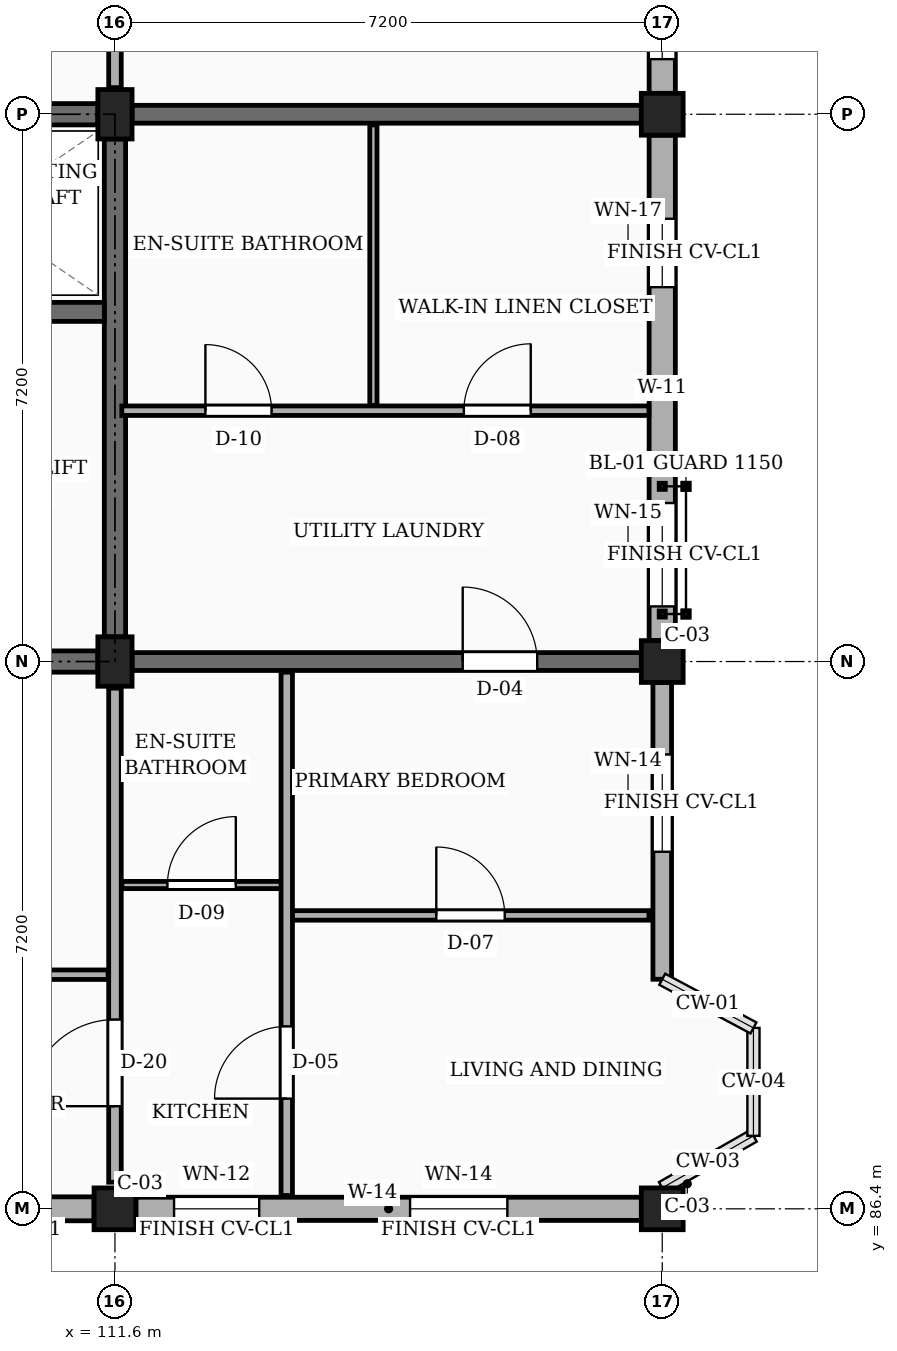
"""IFC4 building model, lengths in metres.
Left out: names, types, materials, properties, quantities, classifications, styles, units other than length and angle.
Written with IfcOpenShell. Run it as: python <this file> out.ifc"""

import sys

from ifc_helpers import new_model, si_unit, direction, frame, frame_2d, origin, origin_2d, place, context, subcontext, project, spatial, rectangle, extrude, element, fill, save


model = new_model("IFC4")
c1 = context("Model", 3, precision=1e-05, world=origin(), true_north=direction((0.0, 1.0)))
c2 = subcontext(c1, "Body", "Model", "MODEL_VIEW")
j1 = project(units=[si_unit("LENGTHUNIT", "METRE"), si_unit("PLANEANGLEUNIT", "RADIAN")], contexts=[c1])
p1 = place(None, origin())
s1 = spatial("IfcSite", under=j1, at=p1, CompositionType="ELEMENT")
p2 = place(p1, origin())
s2 = spatial("IfcBuilding", under=s1, at=p2, CompositionType="ELEMENT")
p3 = place(p2, frame((0.0, 0.0, 20.25)))
s3 = spatial("IfcBuildingStorey", under=s2, at=p3, CompositionType="ELEMENT", Elevation=20.25)
p4 = place(p3, frame((111.6, 86.4, 0.0), z_axis=(0.0, 0.0, 1.0), x_axis=(1.0, 0.0, 0.0)))
e1 = element("IfcColumn", 1, at=p4, inside=s3, PredefinedType="COLUMN", context=c2, shape_type="SweptSolid", body=[
    extrude(rectangle(XDim=0.55, YDim=0.55, at=origin_2d()), origin(), (0.0, 0.0, 1.0), 3.15),
])
for number, where, z_axis, x_axis in (
    (2, (111.6, 93.6, 0.0), (0.0, 0.0, 1.0), (1.0, 0.0, 0.0)),
    (3, (111.6, 100.8, 0.0), (0.0, 0.0, 1.0), (1.0, 0.0, 0.0)),
):
    element("IfcColumn", number, at=place(p3, frame(where, z_axis=z_axis, x_axis=x_axis)), inside=s3, PredefinedType="COLUMN", context=c2, shape_type="SweptSolid", body=[
        extrude(rectangle(XDim=0.45, YDim=0.65, at=origin_2d()), origin(), (0.0, 0.0, 1.0), 3.15),
    ])
for number, where, z_axis, x_axis in (
    (4, (118.8, 86.4, 0.0), (0.0, 0.0, 1.0), (1.0, 0.0, 0.0)),
    (5, (118.8, 93.6, 0.0), (0.0, 0.0, 1.0), (1.0, 0.0, 0.0)),
    (6, (118.8, 100.8, 0.0), (0.0, 0.0, 1.0), (1.0, 0.0, 0.0)),
):
    element("IfcColumn", number, at=place(p3, frame(where, z_axis=z_axis, x_axis=x_axis)), inside=s3, PredefinedType="COLUMN", context=c2, shape_type="SweptSolid", body=[
        extrude(rectangle(XDim=0.55, YDim=0.55, at=origin_2d()), origin(), (0.0, 0.0, 1.0), 3.15),
    ])
p5 = place(p3, frame((111.825, 93.6, 0.0), z_axis=(0.0, 0.0, 1.0), x_axis=(1.0, 0.0, 0.0)))
e7 = element("IfcWall", 7, at=p5, inside=s3, PredefinedType="SOLIDWALL", context=c2, shape_type="SweptSolid", body=[
    extrude(rectangle(XDim=6.7, YDim=0.235, at=frame_2d((3.35, 0.0))), origin(), (0.0, 0.0, 1.0), 2.19),
])
p6 = place(p5, frame((4.35, 0.0, 0.0)))
e8 = element("IfcOpeningElement", 8, at=p6, cuts=e7, PredefinedType="OPENING", context=c2, shape_type="SweptSolid", body=[
    extrude(rectangle(XDim=0.98, YDim=2.12, at=frame_2d((0.49, 1.06))), frame((0.0, 0.127, 0.0), z_axis=(0.0, -1.0, 0.0), x_axis=(1.0, 0.0, 0.0)), (0.0, 0.0, 1.0), 0.255),
])
p7 = place(p3, frame((111.825, 100.8, 0.0), z_axis=(0.0, 0.0, 1.0), x_axis=(1.0, 0.0, 0.0)))
e9 = element("IfcWall", 9, at=p7, inside=s3, PredefinedType="SOLIDWALL", context=c2, shape_type="SweptSolid", body=[
    extrude(rectangle(XDim=6.7, YDim=0.235, at=frame_2d((3.35, 0.0))), origin(), (0.0, 0.0, 1.0), 2.19),
])
p8 = place(p3, frame((104.675, 86.4, 0.0), z_axis=(0.0, 0.0, 1.0), x_axis=(1.0, 0.0, 0.0)))
e10 = element("IfcWall", 10, at=p8, inside=s3, PredefinedType="SOLIDWALL", context=c2, shape_type="SweptSolid", body=[
    extrude(rectangle(XDim=6.65, YDim=0.315, at=frame_2d((3.325, 0.0))), origin(), (0.0, 0.0, 1.0), 2.46),
])
p9 = place(p8, frame((0.45, 0.0, 0.78)))
e11 = element("IfcOpeningElement", 11, at=p9, cuts=e10, PredefinedType="OPENING", context=c2, shape_type="SweptSolid", body=[
    extrude(rectangle(XDim=0.96, YDim=1.26, at=frame_2d((0.48, 0.63))), frame((0.0, 0.167, 0.0), z_axis=(0.0, -1.0, 0.0), x_axis=(1.0, 0.0, 0.0)), (0.0, 0.0, 1.0), 0.335),
])
p10 = place(p8, frame((4.65, 0.0, 0.78)))
e12 = element("IfcOpeningElement", 12, at=p10, cuts=e10, PredefinedType="OPENING", context=c2, shape_type="SweptSolid", body=[
    extrude(rectangle(XDim=1.12, YDim=1.26, at=frame_2d((0.56, 0.63))), frame((0.0, 0.167, 0.0), z_axis=(0.0, -1.0, 0.0), x_axis=(1.0, 0.0, 0.0)), (0.0, 0.0, 1.0), 0.335),
])
p11 = place(p3, frame((111.875, 86.4, 0.0), z_axis=(0.0, 0.0, 1.0), x_axis=(1.0, 0.0, 0.0)))
e13 = element("IfcWall", 13, at=p11, inside=s3, PredefinedType="SOLIDWALL", context=c2, shape_type="SweptSolid", body=[
    extrude(rectangle(XDim=6.65, YDim=0.305, at=frame_2d((3.325, 0.0))), origin(), (0.0, 0.0, 1.0), 2.46),
])
p12 = place(p11, frame((0.502, 0.0, 0.78)))
e14 = element("IfcOpeningElement", 14, at=p12, cuts=e13, PredefinedType="OPENING", context=c2, shape_type="SweptSolid", body=[
    extrude(rectangle(XDim=1.12, YDim=1.26, at=frame_2d((0.56, 0.63))), frame((0.0, 0.163, 0.0), z_axis=(0.0, -1.0, 0.0), x_axis=(1.0, 0.0, 0.0)), (0.0, 0.0, 1.0), 0.325),
])
p13 = place(p11, frame((3.607, 0.0, 0.78)))
e15 = element("IfcOpeningElement", 15, at=p13, cuts=e13, PredefinedType="OPENING", context=c2, shape_type="SweptSolid", body=[
    extrude(rectangle(XDim=1.28, YDim=1.26, at=frame_2d((0.64, 0.63))), frame((0.0, 0.163, 0.0), z_axis=(0.0, -1.0, 0.0), x_axis=(1.0, 0.0, 0.0)), (0.0, 0.0, 1.0), 0.325),
])
p14 = place(p3, frame((118.8, 89.42, 0.0), z_axis=(0.0, 0.0, 1.0), x_axis=(0.0, 1.0, 0.0)))
e16 = element("IfcWall", 16, at=p14, inside=s3, PredefinedType="SOLIDWALL", context=c2, shape_type="SweptSolid", body=[
    extrude(rectangle(XDim=3.905, YDim=0.245, at=frame_2d((1.953, 0.0))), origin(), (0.0, 0.0, 1.0), 2.46),
])
p15 = place(p14, frame((1.677, 0.0, 0.78)))
e17 = element("IfcOpeningElement", 17, at=p15, cuts=e16, PredefinedType="OPENING", context=c2, shape_type="SweptSolid", body=[
    extrude(rectangle(XDim=1.28, YDim=1.26, at=frame_2d((0.64, 0.63))), frame((0.0, 0.133, 0.0), z_axis=(0.0, -1.0, 0.0), x_axis=(1.0, 0.0, 0.0)), (0.0, 0.0, 1.0), 0.265),
])
p16 = place(p3, frame((118.8, 93.875, 0.0), z_axis=(0.0, 0.0, 1.0), x_axis=(0.0, 1.0, 0.0)))
e18 = element("IfcWall", 18, at=p16, inside=s3, PredefinedType="SOLIDWALL", context=c2, shape_type="SweptSolid", body=[
    extrude(rectangle(XDim=6.65, YDim=0.345, at=frame_2d((3.325, 0.0))), origin(), (0.0, 0.0, 1.0), 2.46),
])
p17 = place(p16, frame((0.45, 0.0, 0.78)))
e19 = element("IfcOpeningElement", 19, at=p17, cuts=e18, PredefinedType="OPENING", context=c2, shape_type="SweptSolid", body=[
    extrude(rectangle(XDim=1.36, YDim=1.26, at=frame_2d((0.68, 0.63))), frame((0.0, 0.183, 0.0), z_axis=(0.0, -1.0, 0.0), x_axis=(1.0, 0.0, 0.0)), (0.0, 0.0, 1.0), 0.365),
])
p18 = place(p16, frame((4.65, 0.0, 0.78)))
e20 = element("IfcOpeningElement", 20, at=p18, cuts=e18, PredefinedType="OPENING", context=c2, shape_type="SweptSolid", body=[
    extrude(rectangle(XDim=0.9, YDim=1.36, at=frame_2d((0.45, 0.68))), frame((0.0, 0.183, 0.0), z_axis=(0.0, -1.0, 0.0), x_axis=(1.0, 0.0, 0.0)), (0.0, 0.0, 1.0), 0.365),
])
p19 = place(p3, frame((118.8, 101.075, 0.0), z_axis=(0.0, 0.0, 1.0), x_axis=(0.0, 1.0, 0.0)))
e21 = element("IfcWall", 21, at=p19, inside=s3, PredefinedType="SOLIDWALL", context=c2, shape_type="SweptSolid", body=[
    extrude(rectangle(XDim=6.65, YDim=0.345, at=frame_2d((3.325, 0.0))), origin(), (0.0, 0.0, 1.0), 2.46),
])
p20 = place(p19, frame((0.45, 0.0, 0.78)))
e22 = element("IfcOpeningElement", 22, at=p20, cuts=e21, PredefinedType="OPENING", context=c2, shape_type="SweptSolid", body=[
    extrude(rectangle(XDim=0.9, YDim=1.36, at=frame_2d((0.45, 0.68))), frame((0.0, 0.183, 0.0), z_axis=(0.0, -1.0, 0.0), x_axis=(1.0, 0.0, 0.0)), (0.0, 0.0, 1.0), 0.365),
])
p21 = place(p19, frame((4.65, 0.0, 0.78)))
e23 = element("IfcOpeningElement", 23, at=p21, cuts=e21, PredefinedType="OPENING", context=c2, shape_type="SweptSolid", body=[
    extrude(rectangle(XDim=1.06, YDim=1.36, at=frame_2d((0.53, 0.68))), frame((0.0, 0.183, 0.0), z_axis=(0.0, -1.0, 0.0), x_axis=(1.0, 0.0, 0.0)), (0.0, 0.0, 1.0), 0.365),
])
p22 = place(p3, frame((104.625, 100.8, 0.0), z_axis=(0.0, 0.0, 1.0), x_axis=(1.0, 0.0, 0.0)))
e24 = element("IfcWall", 24, at=p22, inside=s3, PredefinedType="SHEAR", context=c2, shape_type="SweptSolid", body=[
    extrude(rectangle(XDim=6.75, YDim=0.28, at=frame_2d((3.375, 0.0))), origin(), (0.0, 0.0, 1.0), 2.89),
])
p23 = place(p3, frame((111.6, 93.925, 0.0), z_axis=(0.0, 0.0, 1.0), x_axis=(0.0, 1.0, 0.0)))
e25 = element("IfcWall", 25, at=p23, inside=s3, PredefinedType="SHEAR", context=c2, shape_type="SweptSolid", body=[
    extrude(rectangle(XDim=6.55, YDim=0.28, at=frame_2d((3.275, 0.0))), origin(), (0.0, 0.0, 1.0), 2.89),
])
p24 = place(p3, frame((104.625, 93.6, 0.0), z_axis=(0.0, 0.0, 1.0), x_axis=(1.0, 0.0, 0.0)))
e26 = element("IfcWall", 26, at=p24, inside=s3, PredefinedType="SHEAR", context=c2, shape_type="SweptSolid", body=[
    extrude(rectangle(XDim=6.75, YDim=0.28, at=frame_2d((3.375, 0.0))), origin(), (0.0, 0.0, 1.0), 2.89),
])
p25 = place(p24, frame((4.525, 0.0, 0.0)))
e27 = element("IfcOpeningElement", 27, at=p25, cuts=e26, PredefinedType="OPENING", context=c2, shape_type="SweptSolid", body=[
    extrude(rectangle(XDim=1.1, YDim=2.15, at=frame_2d((0.55, 1.075))), frame((0.0, 0.15, 0.0), z_axis=(0.0, -1.0, 0.0), x_axis=(1.0, 0.0, 0.0)), (0.0, 0.0, 1.0), 0.3),
])
p26 = place(p3, frame((108.125, 98.2, 0.0), z_axis=(0.0, 0.0, 1.0), x_axis=(1.0, 0.0, 0.0)))
e28 = element("IfcWall", 28, at=p26, inside=s3, PredefinedType="SHEAR", context=c2, shape_type="SweptSolid", body=[
    extrude(rectangle(XDim=3.335, YDim=0.25, at=frame_2d((1.667, 0.0))), origin(), (0.0, 0.0, 1.0), 2.89),
])
p27 = place(p26, frame((1.1, 0.0, 0.0)))
e29 = element("IfcOpeningElement", 29, at=p27, cuts=e28, PredefinedType="OPENING", context=c2, shape_type="SweptSolid", body=[
    extrude(rectangle(XDim=1.1, YDim=2.2, at=frame_2d((0.55, 1.1))), frame((0.0, 0.135, 0.0), z_axis=(0.0, -1.0, 0.0), x_axis=(1.0, 0.0, 0.0)), (0.0, 0.0, 1.0), 0.27),
])
p28 = place(p3, frame((111.6, 86.75, 0.0), z_axis=(0.0, 0.0, 1.0), x_axis=(0.0, 1.0, 0.0)))
e30 = element("IfcWall", 30, at=p28, inside=s3, PredefinedType="PARTITIONING", context=c2, shape_type="SweptSolid", body=[
    extrude(rectangle(XDim=6.5, YDim=0.165, at=frame_2d((3.25, 0.0))), origin(), (0.0, 0.0, 1.0), 2.325),
])
p29 = place(p28, frame((1.0, 0.0, 0.0)))
e31 = element("IfcOpeningElement", 31, at=p29, cuts=e30, PredefinedType="OPENING", context=c2, shape_type="SweptSolid", body=[
    extrude(rectangle(XDim=1.14, YDim=2.18, at=frame_2d((0.57, 1.09))), frame((0.0, 0.093, 0.0), z_axis=(0.0, -1.0, 0.0), x_axis=(1.0, 0.0, 0.0)), (0.0, 0.0, 1.0), 0.185),
])
p30 = place(p3, frame((111.6, 101.15, 0.0), z_axis=(0.0, 0.0, 1.0), x_axis=(0.0, 1.0, 0.0)))
e32 = element("IfcWall", 32, at=p30, inside=s3, PredefinedType="PARTITIONING", context=c2, shape_type="SweptSolid", body=[
    extrude(rectangle(XDim=6.5, YDim=0.165, at=frame_2d((3.25, 0.0))), origin(), (0.0, 0.0, 1.0), 2.325),
])
p31 = place(p30, frame((1.1, 0.0, 0.0)))
e33 = element("IfcOpeningElement", 33, at=p31, cuts=e32, PredefinedType="OPENING", context=c2, shape_type="SweptSolid", body=[
    extrude(rectangle(XDim=1.0, YDim=2.15, at=frame_2d((0.5, 1.075))), frame((0.0, 0.093, 0.0), z_axis=(0.0, -1.0, 0.0), x_axis=(1.0, 0.0, 0.0)), (0.0, 0.0, 1.0), 0.185),
])
p32 = place(p3, frame((104.49, 89.48, 0.0), z_axis=(0.0, 0.0, 1.0), x_axis=(1.0, 0.0, 0.0)))
e34 = element("IfcWall", 34, at=p32, inside=s3, PredefinedType="PARTITIONING", context=c2, shape_type="SweptSolid", body=[
    extrude(rectangle(XDim=7.02, YDim=0.125, at=frame_2d((3.51, 0.0))), origin(), (0.0, 0.0, 1.0), 2.325),
])
p33 = place(p32, frame((2.85, 0.0, 0.0)))
e35 = element("IfcOpeningElement", 35, at=p33, cuts=e34, PredefinedType="OPENING", context=c2, shape_type="SweptSolid", body=[
    extrude(rectangle(XDim=1.02, YDim=2.15, at=frame_2d((0.51, 1.075))), frame((0.0, 0.073, 0.0), z_axis=(0.0, -1.0, 0.0), x_axis=(1.0, 0.0, 0.0)), (0.0, 0.0, 1.0), 0.145),
])
p34 = place(p3, frame((113.93, 90.26, 0.0), z_axis=(0.0, 0.0, 1.0), x_axis=(1.0, 0.0, 0.0)))
e36 = element("IfcWall", 36, at=p34, inside=s3, PredefinedType="PARTITIONING", context=c2, shape_type="SweptSolid", body=[
    extrude(rectangle(XDim=4.695, YDim=0.125, at=frame_2d((2.348, 0.0))), origin(), (0.0, 0.0, 1.0), 2.325),
])
p35 = place(p34, frame((1.897, 0.0, 0.0)))
e37 = element("IfcOpeningElement", 37, at=p35, cuts=e36, PredefinedType="OPENING", context=c2, shape_type="SweptSolid", body=[
    extrude(rectangle(XDim=0.9, YDim=2.1, at=frame_2d((0.45, 1.05))), frame((0.0, 0.073, 0.0), z_axis=(0.0, -1.0, 0.0), x_axis=(1.0, 0.0, 0.0)), (0.0, 0.0, 1.0), 0.145),
])
p36 = place(p3, frame((111.69, 90.66, 0.0), z_axis=(0.0, 0.0, 1.0), x_axis=(1.0, 0.0, 0.0)))
e38 = element("IfcWall", 38, at=p36, inside=s3, PredefinedType="PARTITIONING", context=c2, shape_type="SweptSolid", body=[
    extrude(rectangle(XDim=2.1, YDim=0.095, at=frame_2d((1.05, 0.0))), origin(), (0.0, 0.0, 1.0), 2.325),
])
p37 = place(p36, frame((0.6, 0.0, 0.0)))
e39 = element("IfcOpeningElement", 39, at=p37, cuts=e38, PredefinedType="OPENING", context=c2, shape_type="SweptSolid", body=[
    extrude(rectangle(XDim=0.9, YDim=2.05, at=frame_2d((0.45, 1.025))), frame((0.0, 0.058, 0.0), z_axis=(0.0, -1.0, 0.0), x_axis=(1.0, 0.0, 0.0)), (0.0, 0.0, 1.0), 0.115),
])
p38 = place(p3, frame((113.86, 86.575, 0.0), z_axis=(0.0, 0.0, 1.0), x_axis=(0.0, 1.0, 0.0)))
e40 = element("IfcWall", 40, at=p38, inside=s3, PredefinedType="PARTITIONING", context=c2, shape_type="SweptSolid", body=[
    extrude(rectangle(XDim=6.885, YDim=0.15, at=frame_2d((3.442, 0.0))), origin(), (0.0, 0.0, 1.0), 2.325),
])
p39 = place(p38, frame((1.275, 0.0, 0.0)))
e41 = element("IfcOpeningElement", 41, at=p39, cuts=e40, PredefinedType="OPENING", context=c2, shape_type="SweptSolid", body=[
    extrude(rectangle(XDim=0.95, YDim=2.1, at=frame_2d((0.475, 1.05))), frame((0.0, 0.085, 0.0), z_axis=(0.0, -1.0, 0.0), x_axis=(1.0, 0.0, 0.0)), (0.0, 0.0, 1.0), 0.17),
])
p40 = place(p3, frame((111.69, 96.9, 0.0), z_axis=(0.0, 0.0, 1.0), x_axis=(1.0, 0.0, 0.0)))
e42 = element("IfcWall", 42, at=p40, inside=s3, PredefinedType="PARTITIONING", context=c2, shape_type="SweptSolid", body=[
    extrude(rectangle(XDim=6.935, YDim=0.125, at=frame_2d((3.468, 0.0))), origin(), (0.0, 0.0, 1.0), 2.325),
])
p41 = place(p40, frame((1.1, 0.0, 0.0)))
e43 = element("IfcOpeningElement", 43, at=p41, cuts=e42, PredefinedType="OPENING", context=c2, shape_type="SweptSolid", body=[
    extrude(rectangle(XDim=0.87, YDim=2.05, at=frame_2d((0.435, 1.025))), frame((0.0, 0.073, 0.0), z_axis=(0.0, -1.0, 0.0), x_axis=(1.0, 0.0, 0.0)), (0.0, 0.0, 1.0), 0.145),
])
p42 = place(p40, frame((4.5, 0.0, 0.0)))
e44 = element("IfcOpeningElement", 44, at=p42, cuts=e42, PredefinedType="OPENING", context=c2, shape_type="SweptSolid", body=[
    extrude(rectangle(XDim=0.88, YDim=2.08, at=frame_2d((0.44, 1.04))), frame((0.0, 0.073, 0.0), z_axis=(0.0, -1.0, 0.0), x_axis=(1.0, 0.0, 0.0)), (0.0, 0.0, 1.0), 0.145),
])
p43 = place(p3, frame((115.0, 96.97, 0.0), z_axis=(0.0, 0.0, 1.0), x_axis=(0.0, 1.0, 0.0)))
e45 = element("IfcWall", 45, at=p43, inside=s3, PredefinedType="PARTITIONING", context=c2, shape_type="SweptSolid", body=[
    extrude(rectangle(XDim=3.69, YDim=0.095, at=frame_2d((1.845, 0.0))), origin(), (0.0, 0.0, 1.0), 2.325),
])
p44 = place(p12, origin())
e46 = element("IfcWindow", 46, at=p44, inside=s3, PartitioningType="SINGLE_PANEL", PredefinedType="WINDOW", context=c2, shape_type="SweptSolid", body=[
    extrude(rectangle(XDim=1.12, YDim=1.26, at=frame_2d((0.56, 0.63))), frame((0.0, 0.03, 0.0), z_axis=(0.0, -1.0, 0.0), x_axis=(1.0, 0.0, 0.0)), (0.0, 0.0, 1.0), 0.06),
])
fill(e14, e46)
p45 = place(p13, origin())
e47 = element("IfcWindow", 47, at=p45, inside=s3, PartitioningType="SINGLE_PANEL", PredefinedType="WINDOW", context=c2, shape_type="SweptSolid", body=[
    extrude(rectangle(XDim=1.28, YDim=1.26, at=frame_2d((0.64, 0.63))), frame((0.0, 0.03, 0.0), z_axis=(0.0, -1.0, 0.0), x_axis=(1.0, 0.0, 0.0)), (0.0, 0.0, 1.0), 0.06),
])
fill(e15, e47)
p46 = place(p15, origin())
e48 = element("IfcWindow", 48, at=p46, inside=s3, PartitioningType="SINGLE_PANEL", PredefinedType="WINDOW", context=c2, shape_type="SweptSolid", body=[
    extrude(rectangle(XDim=1.28, YDim=1.26, at=frame_2d((0.64, 0.63))), frame((0.0, 0.03, 0.0), z_axis=(0.0, -1.0, 0.0), x_axis=(1.0, 0.0, 0.0)), (0.0, 0.0, 1.0), 0.06),
])
fill(e17, e48)
p47 = place(p17, origin())
e49 = element("IfcWindow", 49, at=p47, inside=s3, PartitioningType="SINGLE_PANEL", PredefinedType="WINDOW", context=c2, shape_type="SweptSolid", body=[
    extrude(rectangle(XDim=1.36, YDim=1.26, at=frame_2d((0.68, 0.63))), frame((0.0, 0.03, 0.0), z_axis=(0.0, -1.0, 0.0), x_axis=(1.0, 0.0, 0.0)), (0.0, 0.0, 1.0), 0.06),
])
fill(e19, e49)
p48 = place(p18, origin())
e50 = element("IfcWindow", 50, at=p48, inside=s3, PartitioningType="SINGLE_PANEL", PredefinedType="WINDOW", context=c2, shape_type="SweptSolid", body=[
    extrude(rectangle(XDim=0.9, YDim=1.36, at=frame_2d((0.45, 0.68))), frame((0.0, 0.03, 0.0), z_axis=(0.0, -1.0, 0.0), x_axis=(1.0, 0.0, 0.0)), (0.0, 0.0, 1.0), 0.06),
])
fill(e20, e50)
p49 = place(p20, origin())
e51 = element("IfcWindow", 51, at=p49, inside=s3, PartitioningType="SINGLE_PANEL", PredefinedType="WINDOW", context=c2, shape_type="SweptSolid", body=[
    extrude(rectangle(XDim=0.9, YDim=1.36, at=frame_2d((0.45, 0.68))), frame((0.0, 0.03, 0.0), z_axis=(0.0, -1.0, 0.0), x_axis=(1.0, 0.0, 0.0)), (0.0, 0.0, 1.0), 0.06),
])
fill(e22, e51)
p50 = place(p29, origin())
e52 = element("IfcDoor", 52, at=p50, inside=s3, OperationType="SINGLE_SWING_LEFT", PredefinedType="DOOR", context=c2, shape_type="SweptSolid", body=[
    extrude(rectangle(XDim=1.14, YDim=2.18, at=frame_2d((0.57, 1.09))), frame((0.0, 0.025, 0.0), z_axis=(0.0, -1.0, 0.0), x_axis=(1.0, 0.0, 0.0)), (0.0, 0.0, 1.0), 0.05),
])
fill(e31, e52)
p51 = place(p35, origin())
e53 = element("IfcDoor", 53, at=p51, inside=s3, OperationType="SINGLE_SWING_LEFT", PredefinedType="DOOR", context=c2, shape_type="SweptSolid", body=[
    extrude(rectangle(XDim=0.9, YDim=2.1, at=frame_2d((0.45, 1.05))), frame((0.0, 0.025, 0.0), z_axis=(0.0, -1.0, 0.0), x_axis=(1.0, 0.0, 0.0)), (0.0, 0.0, 1.0), 0.05),
])
fill(e37, e53)
p52 = place(p37, origin())
e54 = element("IfcDoor", 54, at=p52, inside=s3, OperationType="SINGLE_SWING_RIGHT", PredefinedType="DOOR", context=c2, shape_type="SweptSolid", body=[
    extrude(rectangle(XDim=0.9, YDim=2.05, at=frame_2d((0.45, 1.025))), frame((0.0, 0.025, 0.0), z_axis=(0.0, -1.0, 0.0), x_axis=(1.0, 0.0, 0.0)), (0.0, 0.0, 1.0), 0.05),
])
fill(e39, e54)
p53 = place(p39, origin())
e55 = element("IfcDoor", 55, at=p53, inside=s3, OperationType="SINGLE_SWING_LEFT", PredefinedType="DOOR", context=c2, shape_type="SweptSolid", body=[
    extrude(rectangle(XDim=0.95, YDim=2.1, at=frame_2d((0.475, 1.05))), frame((0.0, 0.025, 0.0), z_axis=(0.0, -1.0, 0.0), x_axis=(1.0, 0.0, 0.0)), (0.0, 0.0, 1.0), 0.05),
])
fill(e41, e55)
p54 = place(p41, origin())
e56 = element("IfcDoor", 56, at=p54, inside=s3, OperationType="SINGLE_SWING_LEFT", PredefinedType="DOOR", context=c2, shape_type="SweptSolid", body=[
    extrude(rectangle(XDim=0.87, YDim=2.05, at=frame_2d((0.435, 1.025))), frame((0.0, 0.025, 0.0), z_axis=(0.0, -1.0, 0.0), x_axis=(1.0, 0.0, 0.0)), (0.0, 0.0, 1.0), 0.05),
])
fill(e43, e56)
p55 = place(p42, origin())
e57 = element("IfcDoor", 57, at=p55, inside=s3, OperationType="SINGLE_SWING_RIGHT", PredefinedType="DOOR", context=c2, shape_type="SweptSolid", body=[
    extrude(rectangle(XDim=0.88, YDim=2.08, at=frame_2d((0.44, 1.04))), frame((0.0, 0.025, 0.0), z_axis=(0.0, -1.0, 0.0), x_axis=(1.0, 0.0, 0.0)), (0.0, 0.0, 1.0), 0.05),
])
fill(e44, e57)
p56 = place(p6, origin())
e58 = element("IfcDoor", 58, at=p56, inside=s3, OperationType="SINGLE_SWING_LEFT", PredefinedType="DOOR", context=c2, shape_type="SweptSolid", body=[
    extrude(rectangle(XDim=0.98, YDim=2.12, at=frame_2d((0.49, 1.06))), frame((0.0, 0.025, 0.0), z_axis=(0.0, -1.0, 0.0), x_axis=(1.0, 0.0, 0.0)), (0.0, 0.0, 1.0), 0.05),
])
fill(e8, e58)
save(model, sys.argv[1])
